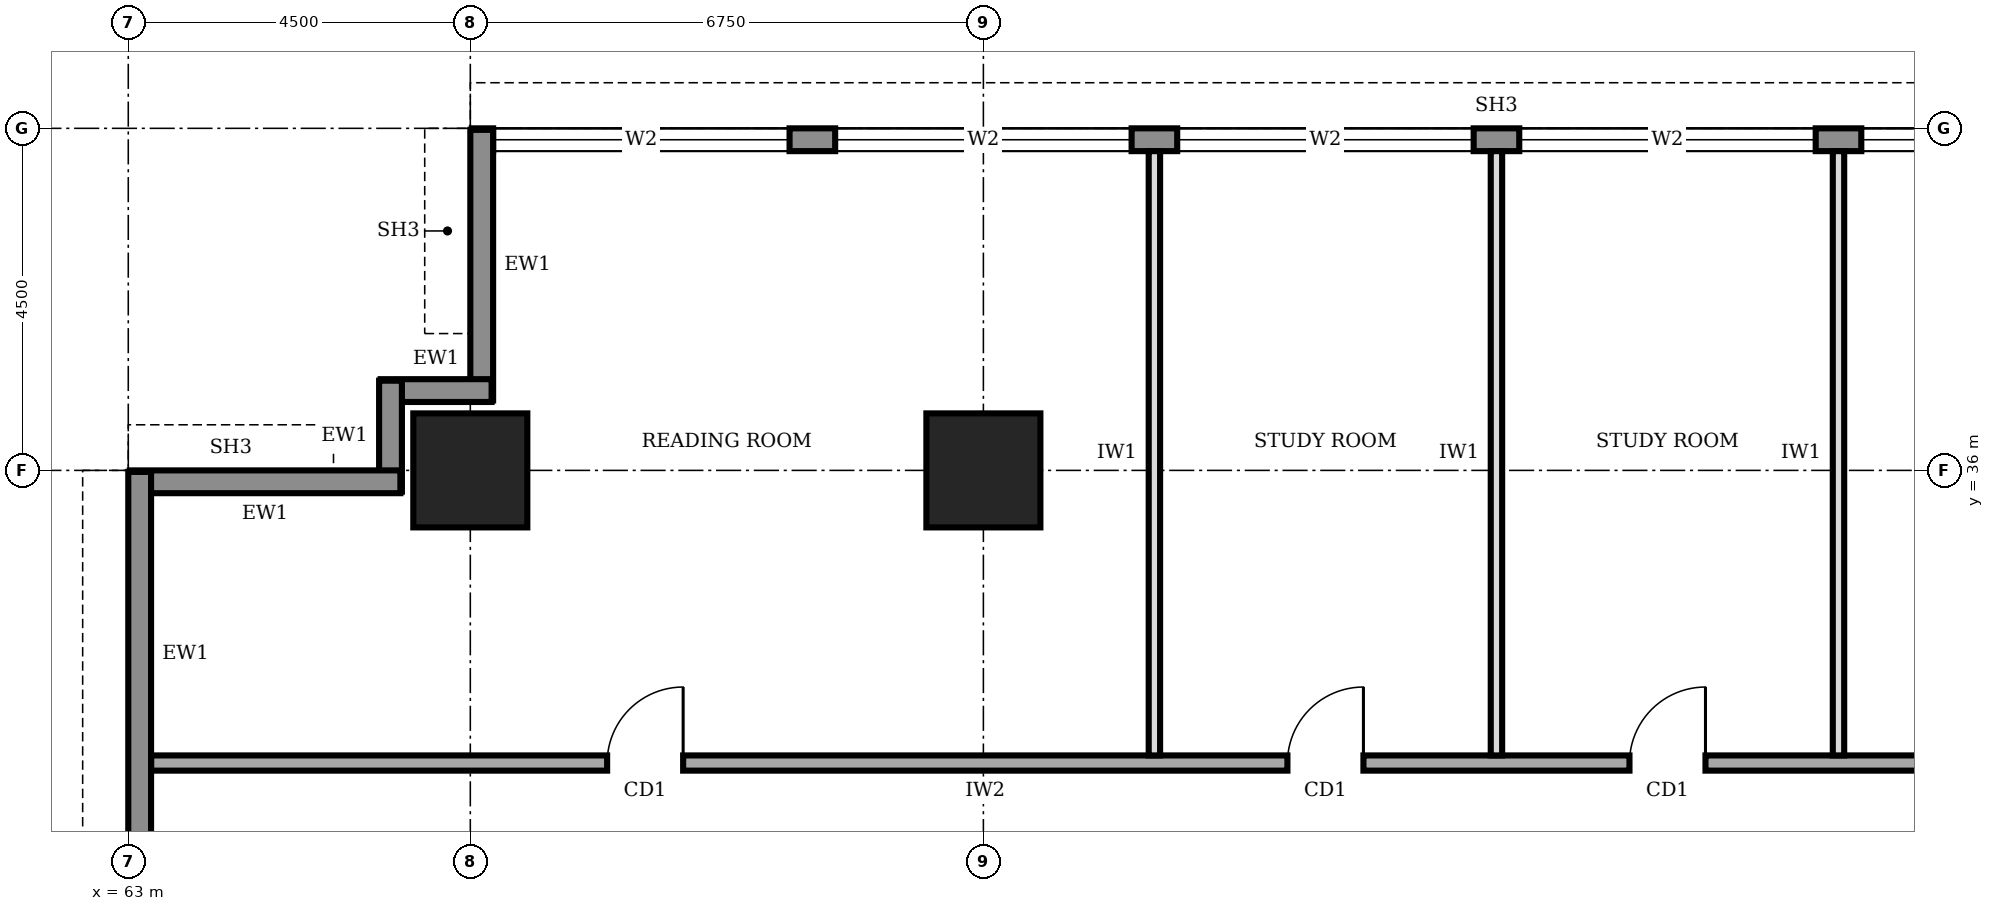
"""IFC4 building model, lengths in metres.
Left out: names, types, materials, properties, quantities, classifications, styles, units other than length and angle.
Written with IfcOpenShell. Run it as: python <this file> out.ifc"""

import sys

from ifc_helpers import new_model, si_unit, direction, frame, frame_2d, origin, origin_2d, place, context, subcontext, project, spatial, rectangle, extrude, element, fill, save


model = new_model("IFC4")
c1 = context("Model", 3, precision=1e-05, world=origin(), true_north=direction((0.0, 1.0)))
c2 = subcontext(c1, "Body", "Model", "MODEL_VIEW")
j1 = project(units=[si_unit("LENGTHUNIT", "METRE"), si_unit("PLANEANGLEUNIT", "RADIAN")], contexts=[c1])
p1 = place(None, origin())
s1 = spatial("IfcSite", under=j1, at=p1, CompositionType="ELEMENT")
p2 = place(p1, origin())
s2 = spatial("IfcBuilding", under=s1, at=p2, CompositionType="ELEMENT")
p3 = place(p2, frame((0.0, 0.0, 165.0)))
s3 = spatial("IfcBuildingStorey", under=s2, at=p3, CompositionType="ELEMENT", Elevation=165.0)
for number, where, z_axis, x_axis in (
    (1, (67.5, 36.0, 0.0), (0.0, 0.0, 1.0), (1.0, 0.0, 0.0)),
    (2, (74.25, 36.0, 0.0), (0.0, 0.0, 1.0), (1.0, 0.0, 0.0)),
):
    element("IfcColumn", number, at=place(p3, frame(where, z_axis=z_axis, x_axis=x_axis)), inside=s3, PredefinedType="COLUMN", context=c2, shape_type="SweptSolid", body=[
        extrude(rectangle(XDim=1.5, YDim=1.5, at=origin_2d()), origin(), (0.0, 0.0, 1.0), 4.0),
    ])
p4 = place(p3, frame((94.48, 40.35, 0.0), z_axis=(0.0, 0.0, 1.0), x_axis=(-1.0, 0.0, 0.0)))
e3 = element("IfcWall", 3, at=p4, inside=s3, PredefinedType="STANDARD", context=c2, shape_type="SweptSolid", body=[
    extrude(rectangle(XDim=26.96, YDim=0.3, at=frame_2d((13.48, 0.0))), origin(), (0.0, 0.0, 1.0), 3.75),
])
p5 = place(p4, frame((22.78, 0.0, 0.6)))
e4 = element("IfcOpeningElement", 4, at=p5, cuts=e3, PredefinedType="OPENING", context=c2, shape_type="SweptSolid", body=[
    extrude(rectangle(XDim=3.9, YDim=2.6, at=frame_2d((1.95, 1.3))), frame((0.0, 0.16, 0.0), z_axis=(0.0, -1.0, 0.0), x_axis=(1.0, 0.0, 0.0)), (0.0, 0.0, 1.0), 0.32),
])
p6 = place(p4, frame((18.28, 0.0, 0.6)))
e5 = element("IfcOpeningElement", 5, at=p6, cuts=e3, PredefinedType="OPENING", context=c2, shape_type="SweptSolid", body=[
    extrude(rectangle(XDim=3.9, YDim=2.6, at=frame_2d((1.95, 1.3))), frame((0.0, 0.16, 0.0), z_axis=(0.0, -1.0, 0.0), x_axis=(1.0, 0.0, 0.0)), (0.0, 0.0, 1.0), 0.32),
])
p7 = place(p4, frame((13.78, 0.0, 0.6)))
e6 = element("IfcOpeningElement", 6, at=p7, cuts=e3, PredefinedType="OPENING", context=c2, shape_type="SweptSolid", body=[
    extrude(rectangle(XDim=3.9, YDim=2.6, at=frame_2d((1.95, 1.3))), frame((0.0, 0.16, 0.0), z_axis=(0.0, -1.0, 0.0), x_axis=(1.0, 0.0, 0.0)), (0.0, 0.0, 1.0), 0.32),
])
p8 = place(p4, frame((9.28, 0.0, 0.6)))
e7 = element("IfcOpeningElement", 7, at=p8, cuts=e3, PredefinedType="OPENING", context=c2, shape_type="SweptSolid", body=[
    extrude(rectangle(XDim=3.9, YDim=2.6, at=frame_2d((1.95, 1.3))), frame((0.0, 0.16, 0.0), z_axis=(0.0, -1.0, 0.0), x_axis=(1.0, 0.0, 0.0)), (0.0, 0.0, 1.0), 0.32),
])
p9 = place(p4, frame((4.78, 0.0, 0.6)))
e8 = element("IfcOpeningElement", 8, at=p9, cuts=e3, PredefinedType="OPENING", context=c2, shape_type="SweptSolid", body=[
    extrude(rectangle(XDim=3.9, YDim=2.6, at=frame_2d((1.95, 1.3))), frame((0.0, 0.16, 0.0), z_axis=(0.0, -1.0, 0.0), x_axis=(1.0, 0.0, 0.0)), (0.0, 0.0, 1.0), 0.32),
])
p10 = place(p3, frame((67.65, 40.48, 0.0), z_axis=(0.0, 0.0, 1.0), x_axis=(0.0, -1.0, 0.0)))
e9 = element("IfcWall", 9, at=p10, inside=s3, PredefinedType="STANDARD", context=c2, shape_type="SweptSolid", body=[
    extrude(rectangle(XDim=3.56, YDim=0.3, at=frame_2d((1.78, 0.0))), origin(), (0.0, 0.0, 1.0), 2.75),
])
for number, where, z_axis, x_axis in (
    (10, (67.78, 37.05, 0.0), (0.0, 0.0, 1.0), (-1.0, 0.0, 0.0)),
    (11, (66.45, 37.18, 0.0), (0.0, 0.0, 1.0), (0.0, -1.0, 0.0)),
):
    element("IfcWall", number, at=place(p3, frame(where, z_axis=z_axis, x_axis=x_axis)), inside=s3, PredefinedType="STANDARD", context=c2, shape_type="SweptSolid", body=[
        extrude(rectangle(XDim=1.46, YDim=0.3, at=frame_2d((0.73, 0.0))), origin(), (0.0, 0.0, 1.0), 3.75),
    ])
p11 = place(p3, frame((66.58, 35.85, 0.0), z_axis=(0.0, 0.0, 1.0), x_axis=(-1.0, 0.0, 0.0)))
e12 = element("IfcWall", 12, at=p11, inside=s3, PredefinedType="STANDARD", context=c2, shape_type="SweptSolid", body=[
    extrude(rectangle(XDim=3.56, YDim=0.3, at=frame_2d((1.78, 0.0))), origin(), (0.0, 0.0, 1.0), 2.75),
])
p12 = place(p3, frame((63.15, 35.98, 0.0), z_axis=(0.0, 0.0, 1.0), x_axis=(0.0, -1.0, 0.0)))
e13 = element("IfcWall", 13, at=p12, inside=s3, PredefinedType="STANDARD", context=c2, shape_type="SweptSolid", body=[
    extrude(rectangle(XDim=31.46, YDim=0.3, at=frame_2d((15.73, 0.0))), origin(), (0.0, 0.0, 1.0), 3.75),
])
p13 = place(p12, frame((27.28, 0.0, 0.6)))
e14 = element("IfcOpeningElement", 14, at=p13, cuts=e13, PredefinedType="OPENING", context=c2, shape_type="SweptSolid", body=[
    extrude(rectangle(XDim=3.9, YDim=2.6, at=frame_2d((1.95, 1.3))), frame((0.0, 0.16, 0.0), z_axis=(0.0, -1.0, 0.0), x_axis=(1.0, 0.0, 0.0)), (0.0, 0.0, 1.0), 0.32),
])
p14 = place(p12, frame((22.78, 0.0, 0.6)))
e15 = element("IfcOpeningElement", 15, at=p14, cuts=e13, PredefinedType="OPENING", context=c2, shape_type="SweptSolid", body=[
    extrude(rectangle(XDim=3.9, YDim=2.6, at=frame_2d((1.95, 1.3))), frame((0.0, 0.16, 0.0), z_axis=(0.0, -1.0, 0.0), x_axis=(1.0, 0.0, 0.0)), (0.0, 0.0, 1.0), 0.32),
])
p15 = place(p12, frame((18.28, 0.0, 0.6)))
e16 = element("IfcOpeningElement", 16, at=p15, cuts=e13, PredefinedType="OPENING", context=c2, shape_type="SweptSolid", body=[
    extrude(rectangle(XDim=3.9, YDim=2.6, at=frame_2d((1.95, 1.3))), frame((0.0, 0.16, 0.0), z_axis=(0.0, -1.0, 0.0), x_axis=(1.0, 0.0, 0.0)), (0.0, 0.0, 1.0), 0.32),
])
p16 = place(p12, frame((13.78, 0.0, 0.6)))
e17 = element("IfcOpeningElement", 17, at=p16, cuts=e13, PredefinedType="OPENING", context=c2, shape_type="SweptSolid", body=[
    extrude(rectangle(XDim=3.9, YDim=2.6, at=frame_2d((1.95, 1.3))), frame((0.0, 0.16, 0.0), z_axis=(0.0, -1.0, 0.0), x_axis=(1.0, 0.0, 0.0)), (0.0, 0.0, 1.0), 0.32),
])
p17 = place(p12, frame((9.28, 0.0, 0.6)))
e18 = element("IfcOpeningElement", 18, at=p17, cuts=e13, PredefinedType="OPENING", context=c2, shape_type="SweptSolid", body=[
    extrude(rectangle(XDim=3.9, YDim=2.6, at=frame_2d((1.95, 1.3))), frame((0.0, 0.16, 0.0), z_axis=(0.0, -1.0, 0.0), x_axis=(1.0, 0.0, 0.0)), (0.0, 0.0, 1.0), 0.32),
])
p18 = place(p12, frame((4.78, 0.0, 0.6)))
e19 = element("IfcOpeningElement", 19, at=p18, cuts=e13, PredefinedType="OPENING", context=c2, shape_type="SweptSolid", body=[
    extrude(rectangle(XDim=3.9, YDim=2.6, at=frame_2d((1.95, 1.3))), frame((0.0, 0.16, 0.0), z_axis=(0.0, -1.0, 0.0), x_axis=(1.0, 0.0, 0.0)), (0.0, 0.0, 1.0), 0.32),
])
p19 = place(p3, frame((89.35, 32.15, 0.0), z_axis=(0.0, 0.0, 1.0), x_axis=(-1.0, 0.0, 0.0)))
e20 = element("IfcWall", 20, at=p19, inside=s3, PredefinedType="SOLIDWALL", context=c2, shape_type="SweptSolid", body=[
    extrude(rectangle(XDim=26.05, YDim=0.2, at=frame_2d((13.025, 0.0))), origin(), (0.0, 0.0, 1.0), 3.75),
])
p20 = place(p19, frame((19.05, 0.0, 0.0)))
e21 = element("IfcOpeningElement", 21, at=p20, cuts=e20, PredefinedType="OPENING", context=c2, shape_type="SweptSolid", body=[
    extrude(rectangle(XDim=1.0, YDim=2.1, at=frame_2d((0.5, 1.05))), frame((0.0, 0.11, 0.0), z_axis=(0.0, -1.0, 0.0), x_axis=(1.0, 0.0, 0.0)), (0.0, 0.0, 1.0), 0.22),
])
p21 = place(p19, frame((10.1, 0.0, 0.0)))
e22 = element("IfcOpeningElement", 22, at=p21, cuts=e20, PredefinedType="OPENING", context=c2, shape_type="SweptSolid", body=[
    extrude(rectangle(XDim=1.0, YDim=2.1, at=frame_2d((0.5, 1.05))), frame((0.0, 0.11, 0.0), z_axis=(0.0, -1.0, 0.0), x_axis=(1.0, 0.0, 0.0)), (0.0, 0.0, 1.0), 0.22),
])
p22 = place(p19, frame((5.6, 0.0, 0.0)))
e23 = element("IfcOpeningElement", 23, at=p22, cuts=e20, PredefinedType="OPENING", context=c2, shape_type="SweptSolid", body=[
    extrude(rectangle(XDim=1.0, YDim=2.1, at=frame_2d((0.5, 1.05))), frame((0.0, 0.11, 0.0), z_axis=(0.0, -1.0, 0.0), x_axis=(1.0, 0.0, 0.0)), (0.0, 0.0, 1.0), 0.22),
])
p23 = place(p19, frame((1.325, 0.0, 0.0)))
e24 = element("IfcOpeningElement", 24, at=p23, cuts=e20, PredefinedType="OPENING", context=c2, shape_type="SweptSolid", body=[
    extrude(rectangle(XDim=1.0, YDim=2.1, at=frame_2d((0.5, 1.05))), frame((0.0, 0.11, 0.0), z_axis=(0.0, -1.0, 0.0), x_axis=(1.0, 0.0, 0.0)), (0.0, 0.0, 1.0), 0.22),
])
for number, where, z_axis, x_axis in (
    (25, (76.5, 32.25, 0.0), (0.0, 0.0, 1.0), (0.0, 1.0, 0.0)),
    (26, (81.0, 32.25, 0.0), (0.0, 0.0, 1.0), (0.0, 1.0, 0.0)),
    (27, (85.5, 32.25, 0.0), (0.0, 0.0, 1.0), (0.0, 1.0, 0.0)),
):
    element("IfcWall", number, at=place(p3, frame(where, z_axis=z_axis, x_axis=x_axis)), inside=s3, PredefinedType="PARTITIONING", context=c2, shape_type="SweptSolid", body=[
        extrude(rectangle(XDim=7.95, YDim=0.15, at=frame_2d((3.975, 0.0))), origin(), (0.0, 0.0, 1.0), 3.75),
    ])
p24 = place(p5, origin())
e28 = element("IfcWindow", 28, at=p24, inside=s3, PartitioningType="SINGLE_PANEL", PredefinedType="WINDOW", context=c2, shape_type="SweptSolid", body=[
    extrude(rectangle(XDim=3.9, YDim=2.6, at=frame_2d((1.95, 1.3))), frame((0.0, 0.03, 0.0), z_axis=(0.0, -1.0, 0.0), x_axis=(1.0, 0.0, 0.0)), (0.0, 0.0, 1.0), 0.06),
])
fill(e4, e28)
p25 = place(p6, origin())
e29 = element("IfcWindow", 29, at=p25, inside=s3, PartitioningType="SINGLE_PANEL", PredefinedType="WINDOW", context=c2, shape_type="SweptSolid", body=[
    extrude(rectangle(XDim=3.9, YDim=2.6, at=frame_2d((1.95, 1.3))), frame((0.0, 0.03, 0.0), z_axis=(0.0, -1.0, 0.0), x_axis=(1.0, 0.0, 0.0)), (0.0, 0.0, 1.0), 0.06),
])
fill(e5, e29)
p26 = place(p7, origin())
e30 = element("IfcWindow", 30, at=p26, inside=s3, PartitioningType="SINGLE_PANEL", PredefinedType="WINDOW", context=c2, shape_type="SweptSolid", body=[
    extrude(rectangle(XDim=3.9, YDim=2.6, at=frame_2d((1.95, 1.3))), frame((0.0, 0.03, 0.0), z_axis=(0.0, -1.0, 0.0), x_axis=(1.0, 0.0, 0.0)), (0.0, 0.0, 1.0), 0.06),
])
fill(e6, e30)
p27 = place(p8, origin())
e31 = element("IfcWindow", 31, at=p27, inside=s3, PartitioningType="SINGLE_PANEL", PredefinedType="WINDOW", context=c2, shape_type="SweptSolid", body=[
    extrude(rectangle(XDim=3.9, YDim=2.6, at=frame_2d((1.95, 1.3))), frame((0.0, 0.03, 0.0), z_axis=(0.0, -1.0, 0.0), x_axis=(1.0, 0.0, 0.0)), (0.0, 0.0, 1.0), 0.06),
])
fill(e7, e31)
p28 = place(p9, origin())
e32 = element("IfcWindow", 32, at=p28, inside=s3, PartitioningType="SINGLE_PANEL", PredefinedType="WINDOW", context=c2, shape_type="SweptSolid", body=[
    extrude(rectangle(XDim=3.9, YDim=2.6, at=frame_2d((1.95, 1.3))), frame((0.0, 0.03, 0.0), z_axis=(0.0, -1.0, 0.0), x_axis=(1.0, 0.0, 0.0)), (0.0, 0.0, 1.0), 0.06),
])
fill(e8, e32)
p29 = place(p20, frame((1.0, 0.0, 0.0), z_axis=(0.0, 0.0, 1.0), x_axis=(-1.0, 0.0, 0.0)))
e33 = element("IfcDoor", 33, at=p29, inside=s3, OperationType="SINGLE_SWING_RIGHT", PredefinedType="DOOR", context=c2, shape_type="SweptSolid", body=[
    extrude(rectangle(XDim=1.0, YDim=2.1, at=frame_2d((0.5, 1.05))), frame((0.0, 0.025, 0.0), z_axis=(0.0, -1.0, 0.0), x_axis=(1.0, 0.0, 0.0)), (0.0, 0.0, 1.0), 0.05),
])
fill(e21, e33)
p30 = place(p21, frame((1.0, 0.0, 0.0), z_axis=(0.0, 0.0, 1.0), x_axis=(-1.0, 0.0, 0.0)))
e34 = element("IfcDoor", 34, at=p30, inside=s3, OperationType="SINGLE_SWING_RIGHT", PredefinedType="DOOR", context=c2, shape_type="SweptSolid", body=[
    extrude(rectangle(XDim=1.0, YDim=2.1, at=frame_2d((0.5, 1.05))), frame((0.0, 0.025, 0.0), z_axis=(0.0, -1.0, 0.0), x_axis=(1.0, 0.0, 0.0)), (0.0, 0.0, 1.0), 0.05),
])
fill(e22, e34)
p31 = place(p22, frame((1.0, 0.0, 0.0), z_axis=(0.0, 0.0, 1.0), x_axis=(-1.0, 0.0, 0.0)))
e35 = element("IfcDoor", 35, at=p31, inside=s3, OperationType="SINGLE_SWING_RIGHT", PredefinedType="DOOR", context=c2, shape_type="SweptSolid", body=[
    extrude(rectangle(XDim=1.0, YDim=2.1, at=frame_2d((0.5, 1.05))), frame((0.0, 0.025, 0.0), z_axis=(0.0, -1.0, 0.0), x_axis=(1.0, 0.0, 0.0)), (0.0, 0.0, 1.0), 0.05),
])
fill(e23, e35)
save(model, sys.argv[1])
